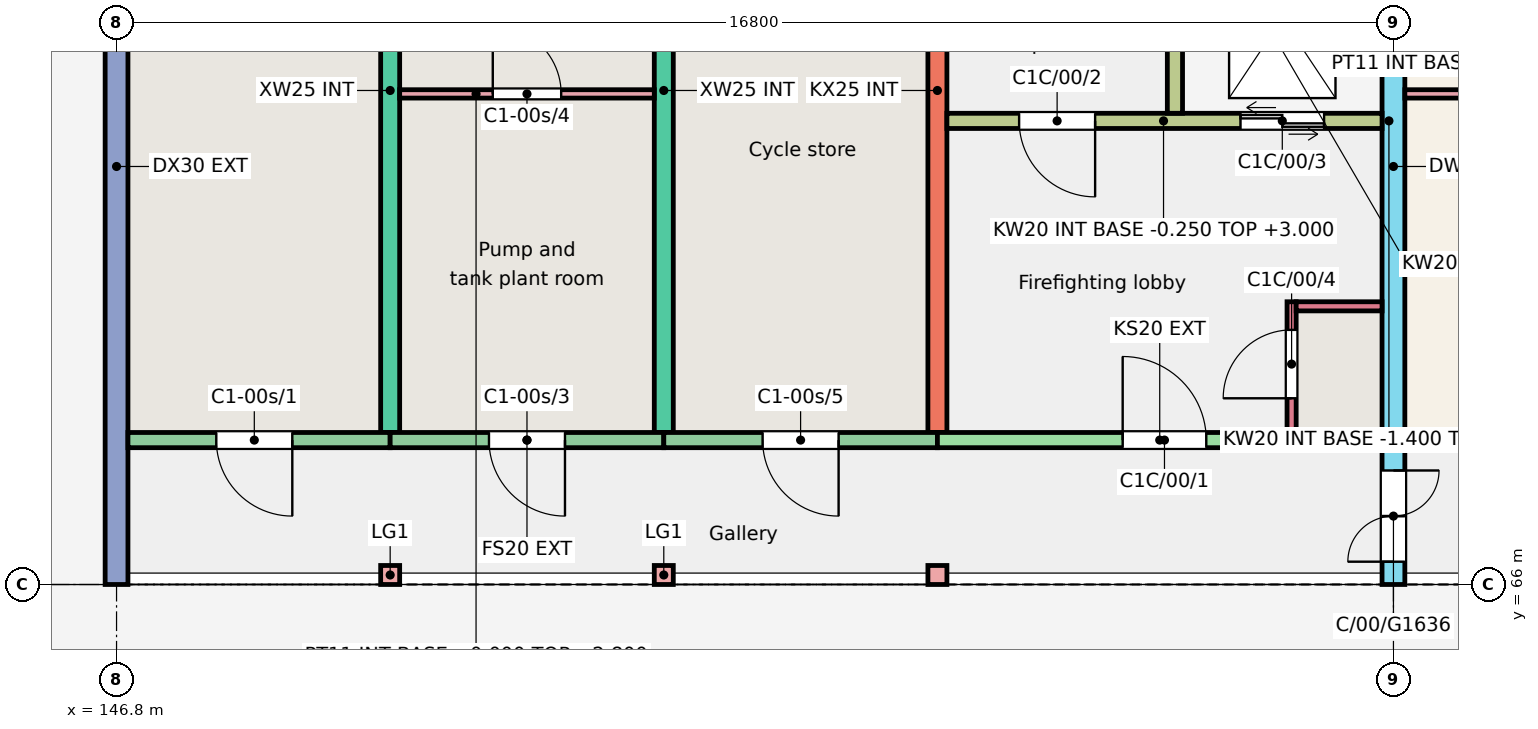
"""IFC4 building model, lengths in metres.
Left out: names, types, materials, properties, quantities, classifications, styles, units other than length and angle.
Written with IfcOpenShell. Run it as: python <this file> out.ifc"""

import sys

from ifc_helpers import new_model, si_unit, direction, frame, frame_2d, origin, origin_2d, place, context, subcontext, project, spatial, rectangle, extrude, element, fill, save


model = new_model("IFC4")
c1 = context("Model", 3, precision=1e-05, world=origin(), true_north=direction((0.0, 1.0)))
c2 = subcontext(c1, "Body", "Model", "MODEL_VIEW")
j1 = project(units=[si_unit("LENGTHUNIT", "METRE"), si_unit("PLANEANGLEUNIT", "RADIAN")], contexts=[c1])
p1 = place(None, origin())
s1 = spatial("IfcSite", under=j1, at=p1, CompositionType="ELEMENT")
p2 = place(p1, origin())
s2 = spatial("IfcBuilding", under=s1, at=p2, CompositionType="ELEMENT")
p3 = place(p2, origin())
s3 = spatial("IfcBuildingStorey", under=s2, at=p3, CompositionType="ELEMENT", Elevation=0.0)
p4 = place(p3, frame((146.8, 66.0, -0.25), z_axis=(0.0, 0.0, 1.0), x_axis=(0.0, 1.0, 0.0)))
e1 = element("IfcWall", 1, at=p4, inside=s3, PredefinedType="SHEAR", context=c2, shape_type="SweptSolid", body=[
    extrude(rectangle(XDim=11.0, YDim=0.3, at=frame_2d((5.5, 0.0))), origin(), (0.0, 0.0, 1.0), 3.25),
])
for number, where, z_axis, x_axis in (
    (2, (150.4, 68.0, -0.25), (0.0, 0.0, 1.0), (0.0, 1.0, 0.0)),
    (3, (154.0, 68.0, -0.25), (0.0, 0.0, 1.0), (0.0, 1.0, 0.0)),
    (4, (157.6, 68.0, -0.25), (0.0, 0.0, 1.0), (0.0, 1.0, 0.0)),
):
    element("IfcWall", number, at=place(p3, frame(where, z_axis=z_axis, x_axis=x_axis)), inside=s3, PredefinedType="SHEAR", context=c2, shape_type="SweptSolid", body=[
        extrude(rectangle(XDim=9.0, YDim=0.25, at=frame_2d((4.5, 0.0))), origin(), (0.0, 0.0, 1.0), 3.25),
    ])
p5 = place(p3, frame((163.6, 66.0, -0.25), z_axis=(0.0, 0.0, 1.0), x_axis=(0.0, 1.0, 0.0)))
e5 = element("IfcWall", 5, at=p5, inside=s3, PredefinedType="SHEAR", context=c2, shape_type="SweptSolid", body=[
    extrude(rectangle(XDim=11.0, YDim=0.3, at=frame_2d((5.5, 0.0))), origin(), (0.0, 0.0, 1.0), 3.25),
])
p6 = place(p5, frame((0.3, 0.0, 0.25)))
e6 = element("IfcOpeningElement", 6, at=p6, cuts=e5, PredefinedType="OPENING", context=c2, shape_type="SweptSolid", body=[
    extrude(rectangle(XDim=1.2, YDim=2.1, at=frame_2d((0.6, 1.05))), frame((0.0, 0.16, 0.0), z_axis=(0.0, -1.0, 0.0), x_axis=(1.0, 0.0, 0.0)), (0.0, 0.0, 1.0), 0.32),
])
p7 = place(p3, frame((146.95, 67.9, -0.25), z_axis=(0.0, 0.0, 1.0), x_axis=(1.0, 0.0, 0.0)))
e7 = element("IfcWall", 7, at=p7, inside=s3, PredefinedType="SOLIDWALL", context=c2, shape_type="SweptSolid", body=[
    extrude(rectangle(XDim=3.45, YDim=0.2, at=frame_2d((1.725, 0.0))), origin(), (0.0, 0.0, 1.0), 3.25),
])
p8 = place(p7, frame((1.163, 0.0, 0.25)))
e8 = element("IfcOpeningElement", 8, at=p8, cuts=e7, PredefinedType="OPENING", context=c2, shape_type="SweptSolid", body=[
    extrude(rectangle(XDim=1.0, YDim=2.1, at=frame_2d((0.5, 1.05))), frame((0.0, 0.11, 0.0), z_axis=(0.0, -1.0, 0.0), x_axis=(1.0, 0.0, 0.0)), (0.0, 0.0, 1.0), 0.22),
])
p9 = place(p3, frame((150.4, 67.9, -0.25), z_axis=(0.0, 0.0, 1.0), x_axis=(1.0, 0.0, 0.0)))
e9 = element("IfcWall", 9, at=p9, inside=s3, PredefinedType="SOLIDWALL", context=c2, shape_type="SweptSolid", body=[
    extrude(rectangle(XDim=3.6, YDim=0.2, at=frame_2d((1.8, 0.0))), origin(), (0.0, 0.0, 1.0), 3.25),
])
p10 = place(p9, frame((1.3, 0.0, 0.25)))
e10 = element("IfcOpeningElement", 10, at=p10, cuts=e9, PredefinedType="OPENING", context=c2, shape_type="SweptSolid", body=[
    extrude(rectangle(XDim=1.0, YDim=2.1, at=frame_2d((0.5, 1.05))), frame((0.0, 0.11, 0.0), z_axis=(0.0, -1.0, 0.0), x_axis=(1.0, 0.0, 0.0)), (0.0, 0.0, 1.0), 0.22),
])
p11 = place(p3, frame((154.0, 67.9, -0.25), z_axis=(0.0, 0.0, 1.0), x_axis=(1.0, 0.0, 0.0)))
e11 = element("IfcWall", 11, at=p11, inside=s3, PredefinedType="SOLIDWALL", context=c2, shape_type="SweptSolid", body=[
    extrude(rectangle(XDim=3.6, YDim=0.2, at=frame_2d((1.8, 0.0))), origin(), (0.0, 0.0, 1.0), 3.25),
])
p12 = place(p11, frame((1.3, 0.0, 0.25)))
e12 = element("IfcOpeningElement", 12, at=p12, cuts=e11, PredefinedType="OPENING", context=c2, shape_type="SweptSolid", body=[
    extrude(rectangle(XDim=1.0, YDim=2.1, at=frame_2d((0.5, 1.05))), frame((0.0, 0.11, 0.0), z_axis=(0.0, -1.0, 0.0), x_axis=(1.0, 0.0, 0.0)), (0.0, 0.0, 1.0), 0.22),
])
p13 = place(p3, frame((157.6, 67.9, -0.25), z_axis=(0.0, 0.0, 1.0), x_axis=(1.0, 0.0, 0.0)))
e13 = element("IfcWall", 13, at=p13, inside=s3, PredefinedType="SHEAR", context=c2, shape_type="SweptSolid", body=[
    extrude(rectangle(XDim=5.85, YDim=0.2, at=frame_2d((2.925, 0.0))), origin(), (0.0, 0.0, 1.0), 3.25),
])
p14 = place(p13, frame((2.438, 0.0, 0.25)))
e14 = element("IfcOpeningElement", 14, at=p14, cuts=e13, PredefinedType="OPENING", context=c2, shape_type="SweptSolid", body=[
    extrude(rectangle(XDim=1.1, YDim=2.1, at=frame_2d((0.55, 1.05))), frame((0.0, 0.11, 0.0), z_axis=(0.0, -1.0, 0.0), x_axis=(1.0, 0.0, 0.0)), (0.0, 0.0, 1.0), 0.22),
])
p15 = place(p3, frame((157.725, 72.1, -0.25), z_axis=(0.0, 0.0, 1.0), x_axis=(1.0, 0.0, 0.0)))
e15 = element("IfcWall", 15, at=p15, inside=s3, PredefinedType="SHEAR", context=c2, shape_type="SweptSolid", body=[
    extrude(rectangle(XDim=5.725, YDim=0.2, at=frame_2d((2.862, 0.0))), origin(), (0.0, 0.0, 1.0), 3.25),
])
p16 = place(p15, frame((0.95, 0.0, 0.25)))
e16 = element("IfcOpeningElement", 16, at=p16, cuts=e15, PredefinedType="OPENING", context=c2, shape_type="SweptSolid", body=[
    extrude(rectangle(XDim=1.0, YDim=2.1, at=frame_2d((0.5, 1.05))), frame((0.0, 0.11, 0.0), z_axis=(0.0, -1.0, 0.0), x_axis=(1.0, 0.0, 0.0)), (0.0, 0.0, 1.0), 0.22),
])
p17 = place(p15, frame((3.863, 0.0, 0.25)))
e17 = element("IfcOpeningElement", 17, at=p17, cuts=e15, PredefinedType="OPENING", context=c2, shape_type="SweptSolid", body=[
    extrude(rectangle(XDim=1.1, YDim=2.1, at=frame_2d((0.55, 1.05))), frame((0.0, 0.11, 0.0), z_axis=(0.0, -1.0, 0.0), x_axis=(1.0, 0.0, 0.0)), (0.0, 0.0, 1.0), 0.22),
])
p18 = place(p3, frame((160.725, 72.2, -0.25), z_axis=(0.0, 0.0, 1.0), x_axis=(0.0, 1.0, 0.0)))
e18 = element("IfcWall", 18, at=p18, inside=s3, PredefinedType="SHEAR", context=c2, shape_type="SweptSolid", body=[
    extrude(rectangle(XDim=4.8, YDim=0.2, at=frame_2d((2.4, 0.0))), origin(), (0.0, 0.0, 1.0), 3.25),
])
p19 = place(p3, frame((162.26, 68.0, -0.25), z_axis=(0.0, 0.0, 1.0), x_axis=(0.0, 1.0, 0.0)))
e19 = element("IfcWall", 19, at=p19, inside=s3, PredefinedType="SHEAR", context=c2, shape_type="SweptSolid", body=[
    extrude(rectangle(XDim=1.72, YDim=0.12, at=frame_2d((0.86, 0.0))), origin(), (0.0, 0.0, 1.0), 3.25),
])
p20 = place(p19, frame((0.45, 0.0, 0.25)))
e20 = element("IfcOpeningElement", 20, at=p20, cuts=e19, PredefinedType="OPENING", context=c2, shape_type="SweptSolid", body=[
    extrude(rectangle(XDim=0.9, YDim=2.1, at=frame_2d((0.45, 1.05))), frame((0.0, 0.07, 0.0), z_axis=(0.0, -1.0, 0.0), x_axis=(1.0, 0.0, 0.0)), (0.0, 0.0, 1.0), 0.14),
])
p21 = place(p3, frame((162.32, 69.66, -0.25), z_axis=(0.0, 0.0, 1.0), x_axis=(1.0, 0.0, 0.0)))
e21 = element("IfcWall", 21, at=p21, inside=s3, PredefinedType="SHEAR", context=c2, shape_type="SweptSolid", body=[
    extrude(rectangle(XDim=1.13, YDim=0.12, at=frame_2d((0.565, 0.0))), origin(), (0.0, 0.0, 1.0), 3.25),
])
p22 = place(p3, frame((163.75, 67.9, -0.25), z_axis=(0.0, 0.0, 1.0), x_axis=(1.0, 0.0, 0.0)))
e22 = element("IfcWall", 22, at=p22, inside=s3, PredefinedType="SOLIDWALL", context=c2, shape_type="SweptSolid", body=[
    extrude(rectangle(XDim=3.45, YDim=0.2, at=frame_2d((1.725, 0.0))), origin(), (0.0, 0.0, 1.0), 3.25),
])
p23 = place(p22, frame((0.925, 0.0, 1.15)))
e23 = element("IfcOpeningElement", 23, at=p23, cuts=e22, PredefinedType="OPENING", context=c2, shape_type="SweptSolid", body=[
    extrude(rectangle(XDim=1.5, YDim=1.5, at=frame_2d((0.75, 0.75))), frame((0.0, 0.11, 0.0), z_axis=(0.0, -1.0, 0.0), x_axis=(1.0, 0.0, 0.0)), (0.0, 0.0, 1.0), 0.22),
])
for number, where, z_axis, x_axis in (
    (24, (150.4, 66.125, -0.25), (0.0, 0.0, 1.0), (1.0, 0.0, 0.0)),
    (25, (154.0, 66.125, -0.25), (0.0, 0.0, 1.0), (1.0, 0.0, 0.0)),
    (26, (157.6, 66.125, -0.25), (0.0, 0.0, 1.0), (1.0, 0.0, 0.0)),
):
    element("IfcColumn", number, at=place(p3, frame(where, z_axis=z_axis, x_axis=x_axis)), inside=s3, PredefinedType="COLUMN", context=c2, shape_type="SweptSolid", body=[
        extrude(rectangle(XDim=0.25, YDim=0.25, at=origin_2d()), origin(), (0.0, 0.0, 1.0), 3.25),
    ])
p24 = place(p3, frame((160.625, 72.1, -1.4), z_axis=(0.0, 0.0, 1.0), x_axis=(1.0, 0.0, 0.0)))
e27 = element("IfcWall", 27, at=p24, inside=s3, PredefinedType="SHEAR", context=c2, shape_type="SweptSolid", body=[
    extrude(rectangle(XDim=2.975, YDim=0.2, at=frame_2d((1.488, 0.0))), origin(), (0.0, 0.0, 1.0), 1.15),
])
p25 = place(p3, frame((160.725, 72.2, -1.4), z_axis=(0.0, 0.0, 1.0), x_axis=(0.0, 1.0, 0.0)))
e28 = element("IfcWall", 28, at=p25, inside=s3, PredefinedType="SHEAR", context=c2, shape_type="SweptSolid", body=[
    extrude(rectangle(XDim=3.0, YDim=0.2, at=frame_2d((1.5, 0.0))), origin(), (0.0, 0.0, 1.0), 1.15),
])
p26 = place(p3, frame((163.525, 72.2, -1.4), z_axis=(0.0, 0.0, 1.0), x_axis=(0.0, 1.0, 0.0)))
e29 = element("IfcWall", 29, at=p26, inside=s3, PredefinedType="SHEAR", context=c2, shape_type="SweptSolid", body=[
    extrude(rectangle(XDim=3.0, YDim=0.15, at=frame_2d((1.5, 0.0))), origin(), (0.0, 0.0, 1.0), 1.15),
])
p27 = place(p3, frame((150.525, 72.455, 0.0), z_axis=(0.0, 0.0, 1.0), x_axis=(1.0, 0.0, 0.0)))
e30 = element("IfcWall", 30, at=p27, inside=s3, PredefinedType="PARTITIONING", context=c2, shape_type="SweptSolid", body=[
    extrude(rectangle(XDim=3.35, YDim=0.11, at=frame_2d((1.675, 0.0))), origin(), (0.0, 0.0, 1.0), 2.8),
])
p28 = place(p27, frame((1.225, 0.0, 0.0)))
e31 = element("IfcOpeningElement", 31, at=p28, cuts=e30, PredefinedType="OPENING", context=c2, shape_type="SweptSolid", body=[
    extrude(rectangle(XDim=0.9, YDim=2.1, at=frame_2d((0.45, 1.05))), frame((0.0, 0.065, 0.0), z_axis=(0.0, -1.0, 0.0), x_axis=(1.0, 0.0, 0.0)), (0.0, 0.0, 1.0), 0.13),
])
p29 = place(p3, frame((163.75, 72.455, 0.0), z_axis=(0.0, 0.0, 1.0), x_axis=(1.0, 0.0, 0.0)))
e32 = element("IfcWall", 32, at=p29, inside=s3, PredefinedType="PARTITIONING", context=c2, shape_type="SweptSolid", body=[
    extrude(rectangle(XDim=3.35, YDim=0.11, at=frame_2d((1.675, 0.0))), origin(), (0.0, 0.0, 1.0), 2.8),
])
p30 = place(p8, origin())
e33 = element("IfcDoor", 33, at=p30, inside=s3, OperationType="SINGLE_SWING_RIGHT", PredefinedType="DOOR", context=c2, shape_type="SweptSolid", body=[
    extrude(rectangle(XDim=1.0, YDim=2.1, at=frame_2d((0.5, 1.05))), frame((0.0, 0.025, 0.0), z_axis=(0.0, -1.0, 0.0), x_axis=(1.0, 0.0, 0.0)), (0.0, 0.0, 1.0), 0.05),
])
fill(e8, e33)
p31 = place(p10, origin())
e34 = element("IfcDoor", 34, at=p31, inside=s3, OperationType="SINGLE_SWING_RIGHT", PredefinedType="DOOR", context=c2, shape_type="SweptSolid", body=[
    extrude(rectangle(XDim=1.0, YDim=2.1, at=frame_2d((0.5, 1.05))), frame((0.0, 0.025, 0.0), z_axis=(0.0, -1.0, 0.0), x_axis=(1.0, 0.0, 0.0)), (0.0, 0.0, 1.0), 0.05),
])
fill(e10, e34)
p32 = place(p28, origin())
e35 = element("IfcDoor", 35, at=p32, inside=s3, OperationType="SINGLE_SWING_LEFT", PredefinedType="DOOR", context=c2, shape_type="SweptSolid", body=[
    extrude(rectangle(XDim=0.9, YDim=2.1, at=frame_2d((0.45, 1.05))), frame((0.0, 0.025, 0.0), z_axis=(0.0, -1.0, 0.0), x_axis=(1.0, 0.0, 0.0)), (0.0, 0.0, 1.0), 0.05),
])
fill(e31, e35)
p33 = place(p12, origin())
e36 = element("IfcDoor", 36, at=p33, inside=s3, OperationType="SINGLE_SWING_RIGHT", PredefinedType="DOOR", context=c2, shape_type="SweptSolid", body=[
    extrude(rectangle(XDim=1.0, YDim=2.1, at=frame_2d((0.5, 1.05))), frame((0.0, 0.025, 0.0), z_axis=(0.0, -1.0, 0.0), x_axis=(1.0, 0.0, 0.0)), (0.0, 0.0, 1.0), 0.05),
])
fill(e12, e36)
p34 = place(p14, origin())
e37 = element("IfcDoor", 37, at=p34, inside=s3, OperationType="SINGLE_SWING_LEFT", PredefinedType="DOOR", context=c2, shape_type="SweptSolid", body=[
    extrude(rectangle(XDim=1.1, YDim=2.1, at=frame_2d((0.55, 1.05))), frame((0.0, 0.025, 0.0), z_axis=(0.0, -1.0, 0.0), x_axis=(1.0, 0.0, 0.0)), (0.0, 0.0, 1.0), 0.05),
])
fill(e14, e37)
p35 = place(p16, origin())
e38 = element("IfcDoor", 38, at=p35, inside=s3, OperationType="SINGLE_SWING_RIGHT", PredefinedType="DOOR", context=c2, shape_type="SweptSolid", body=[
    extrude(rectangle(XDim=1.0, YDim=2.1, at=frame_2d((0.5, 1.05))), frame((0.0, 0.025, 0.0), z_axis=(0.0, -1.0, 0.0), x_axis=(1.0, 0.0, 0.0)), (0.0, 0.0, 1.0), 0.05),
])
fill(e16, e38)
p36 = place(p17, origin())
e39 = element("IfcDoor", 39, at=p36, inside=s3, OperationType="DOUBLE_DOOR_SLIDING", PredefinedType="DOOR", context=c2, shape_type="SweptSolid", body=[
    extrude(rectangle(XDim=1.1, YDim=2.1, at=frame_2d((0.55, 1.05))), frame((0.0, 0.025, 0.0), z_axis=(0.0, -1.0, 0.0), x_axis=(1.0, 0.0, 0.0)), (0.0, 0.0, 1.0), 0.05),
])
fill(e17, e39)
p37 = place(p20, origin())
e40 = element("IfcDoor", 40, at=p37, inside=s3, OperationType="SINGLE_SWING_LEFT", PredefinedType="DOOR", context=c2, shape_type="SweptSolid", body=[
    extrude(rectangle(XDim=0.9, YDim=2.1, at=frame_2d((0.45, 1.05))), frame((0.0, 0.025, 0.0), z_axis=(0.0, -1.0, 0.0), x_axis=(1.0, 0.0, 0.0)), (0.0, 0.0, 1.0), 0.05),
])
fill(e20, e40)
p38 = place(p6, origin())
e41 = element("IfcDoor", 41, at=p38, inside=s3, OperationType="DOUBLE_DOOR_SINGLE_SWING", PredefinedType="DOOR", context=c2, shape_type="SweptSolid", body=[
    extrude(rectangle(XDim=1.2, YDim=2.1, at=frame_2d((0.6, 1.05))), frame((0.0, 0.025, 0.0), z_axis=(0.0, -1.0, 0.0), x_axis=(1.0, 0.0, 0.0)), (0.0, 0.0, 1.0), 0.05),
])
fill(e6, e41)
save(model, sys.argv[1])
